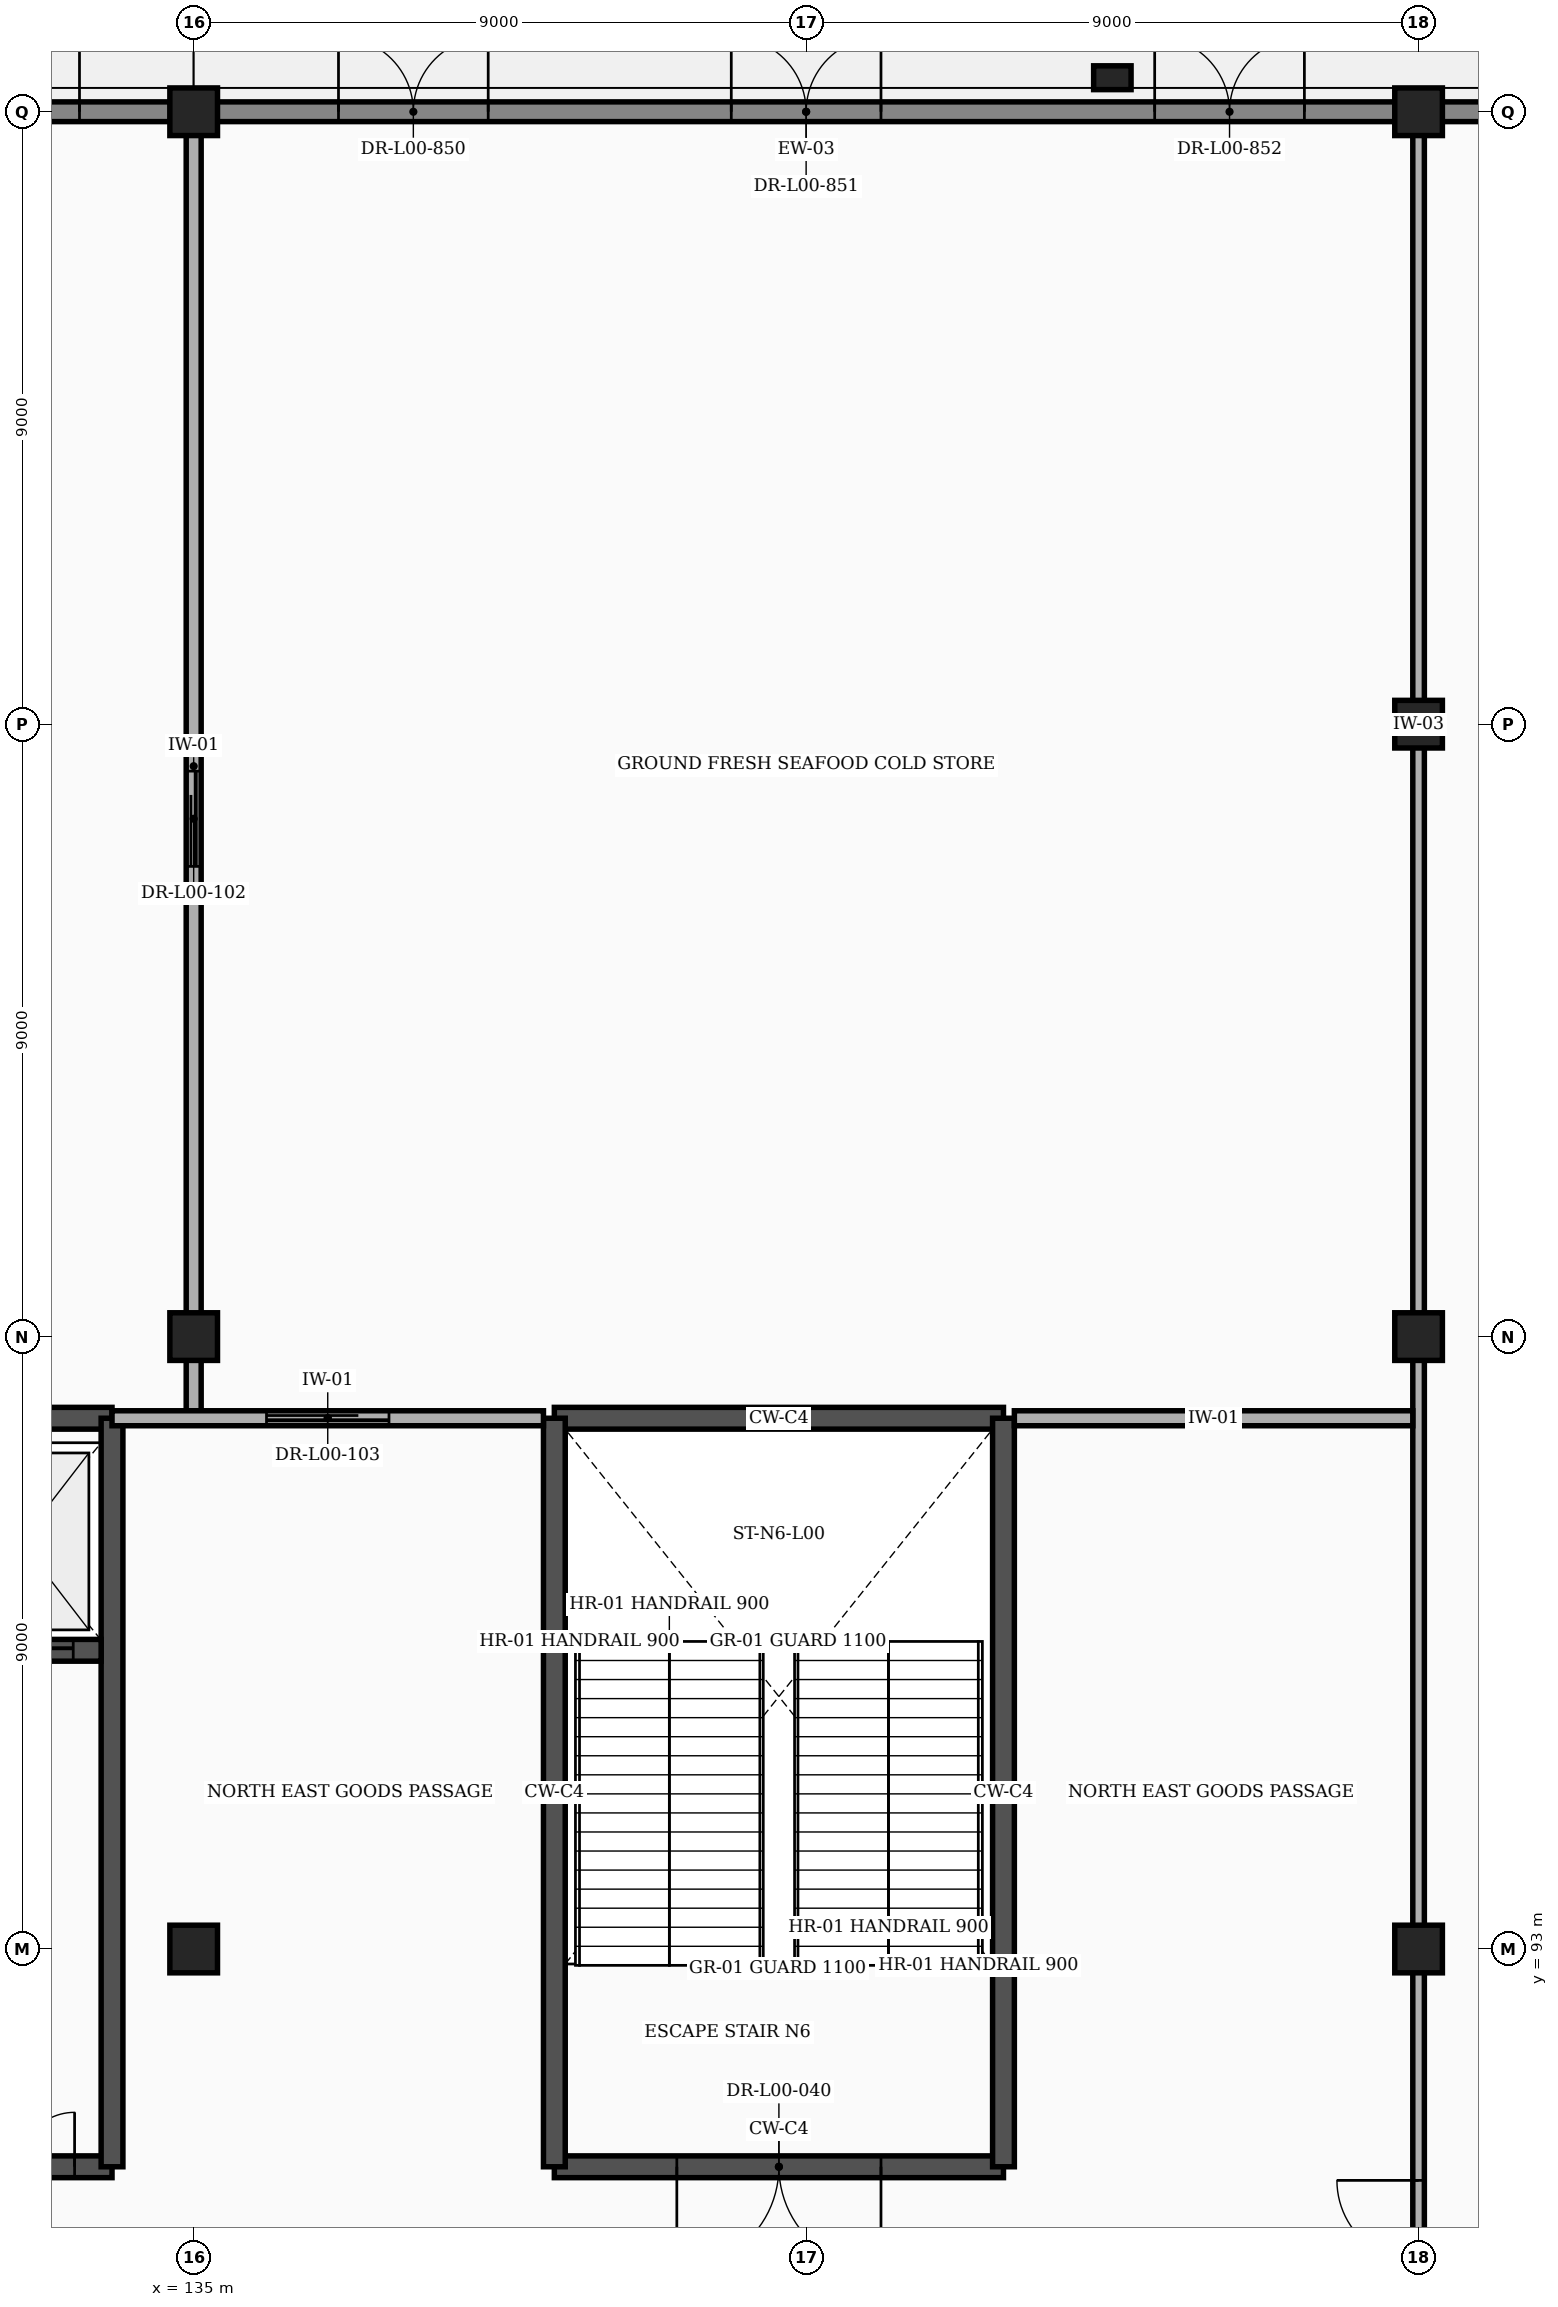
"""IFC4 building model, lengths in metres.
Left out: names, types, materials, properties, quantities, classifications, styles, units other than length and angle.
Written with IfcOpenShell. Run it as: python <this file> out.ifc"""

import sys

from ifc_helpers import new_model, si_unit, direction, frame, frame_2d, origin, origin_2d, place, context, subcontext, project, spatial, rectangle, extrude, element, fill, save


model = new_model("IFC4")
c1 = context("Model", 3, precision=1e-05, world=origin(), true_north=direction((0.0, 1.0)))
c2 = subcontext(c1, "Body", "Model", "MODEL_VIEW")
j1 = project(units=[si_unit("LENGTHUNIT", "METRE"), si_unit("PLANEANGLEUNIT", "RADIAN")], contexts=[c1])
p1 = place(None, origin())
s1 = spatial("IfcSite", under=j1, at=p1, CompositionType="ELEMENT")
p2 = place(p1, origin())
s2 = spatial("IfcBuilding", under=s1, at=p2, CompositionType="ELEMENT")
p3 = place(p2, origin())
s3 = spatial("IfcBuildingStorey", under=s2, at=p3, CompositionType="ELEMENT", Elevation=0.0)
for number, where, z_axis, x_axis in (
    (1, (135.0, 93.0, 0.0), (0.0, 0.0, 1.0), (1.0, 0.0, 0.0)),
    (2, (135.0, 102.0, 0.0), (0.0, 0.0, 1.0), (1.0, 0.0, 0.0)),
    (3, (135.0, 120.0, 0.0), (0.0, 0.0, 1.0), (1.0, 0.0, 0.0)),
    (4, (153.0, 93.0, 0.0), (0.0, 0.0, 1.0), (1.0, 0.0, 0.0)),
    (5, (153.0, 102.0, 0.0), (0.0, 0.0, 1.0), (1.0, 0.0, 0.0)),
    (6, (153.0, 111.0, 0.0), (0.0, 0.0, 1.0), (1.0, 0.0, 0.0)),
    (7, (153.0, 120.0, 0.0), (0.0, 0.0, 1.0), (1.0, 0.0, 0.0)),
):
    element("IfcColumn", number, at=place(p3, frame(where, z_axis=z_axis, x_axis=x_axis)), inside=s3, PredefinedType="COLUMN", context=c2, shape_type="SweptSolid", body=[
        extrude(rectangle(XDim=0.7, YDim=0.7, at=origin_2d()), origin(), (0.0, 0.0, 1.0), 6.0),
    ])
p4 = place(p3, frame((148.5, 120.5, 0.0), z_axis=(0.0, 0.0, 1.0), x_axis=(1.0, 0.0, 0.0)))
e8 = element("IfcColumn", 8, at=p4, inside=s3, PredefinedType="PILASTER", context=c2, shape_type="SweptSolid", body=[
    extrude(rectangle(XDim=0.55, YDim=0.35, at=origin_2d()), origin(), (0.0, 0.0, 1.0), 6.0),
])
p5 = place(p3, frame((117.342, 120.0, 0.0), z_axis=(0.0, 0.0, 1.0), x_axis=(1.0, 0.0, 0.0)))
e9 = element("IfcWall", 9, at=p5, inside=s3, PredefinedType="STANDARD", context=c2, shape_type="SweptSolid", body=[
    extrude(rectangle(XDim=17.316, YDim=0.29, at=frame_2d((8.658, 0.0))), origin(), (0.0, 0.0, 1.0), 4.988),
])
p6 = place(p5, frame((1.786, 0.0, 0.0)))
e10 = element("IfcOpeningElement", 10, at=p6, cuts=e9, PredefinedType="OPENING", context=c2, shape_type="SweptSolid", body=[
    extrude(rectangle(XDim=2.2, YDim=2.4, at=frame_2d((1.1, 1.2))), frame((0.0, 0.157, 0.0), z_axis=(0.0, -1.0, 0.0), x_axis=(1.0, 0.0, 0.0)), (0.0, 0.0, 1.0), 0.314),
])
p7 = place(p5, frame((7.558, 0.0, 0.0)))
e11 = element("IfcOpeningElement", 11, at=p7, cuts=e9, PredefinedType="OPENING", context=c2, shape_type="SweptSolid", body=[
    extrude(rectangle(XDim=2.2, YDim=2.4, at=frame_2d((1.1, 1.2))), frame((0.0, 0.157, 0.0), z_axis=(0.0, -1.0, 0.0), x_axis=(1.0, 0.0, 0.0)), (0.0, 0.0, 1.0), 0.314),
])
p8 = place(p5, frame((13.78, 0.0, 0.0)))
e12 = element("IfcOpeningElement", 12, at=p8, cuts=e9, PredefinedType="OPENING", context=c2, shape_type="SweptSolid", body=[
    extrude(rectangle(XDim=2.2, YDim=2.4, at=frame_2d((1.1, 1.2))), frame((0.0, 0.157, 0.0), z_axis=(0.0, -1.0, 0.0), x_axis=(1.0, 0.0, 0.0)), (0.0, 0.0, 1.0), 0.314),
])
p9 = place(p3, frame((135.342, 120.0, 0.0), z_axis=(0.0, 0.0, 1.0), x_axis=(1.0, 0.0, 0.0)))
e13 = element("IfcWall", 13, at=p9, inside=s3, PredefinedType="STANDARD", context=c2, shape_type="SweptSolid", body=[
    extrude(rectangle(XDim=17.316, YDim=0.29, at=frame_2d((8.658, 0.0))), origin(), (0.0, 0.0, 1.0), 4.988),
])
p10 = place(p9, frame((1.786, 0.0, 0.0)))
e14 = element("IfcOpeningElement", 14, at=p10, cuts=e13, PredefinedType="OPENING", context=c2, shape_type="SweptSolid", body=[
    extrude(rectangle(XDim=2.2, YDim=2.4, at=frame_2d((1.1, 1.2))), frame((0.0, 0.157, 0.0), z_axis=(0.0, -1.0, 0.0), x_axis=(1.0, 0.0, 0.0)), (0.0, 0.0, 1.0), 0.314),
])
p11 = place(p9, frame((7.558, 0.0, 0.0)))
e15 = element("IfcOpeningElement", 15, at=p11, cuts=e13, PredefinedType="OPENING", context=c2, shape_type="SweptSolid", body=[
    extrude(rectangle(XDim=2.2, YDim=2.4, at=frame_2d((1.1, 1.2))), frame((0.0, 0.157, 0.0), z_axis=(0.0, -1.0, 0.0), x_axis=(1.0, 0.0, 0.0)), (0.0, 0.0, 1.0), 0.314),
])
p12 = place(p9, frame((13.78, 0.0, 0.0)))
e16 = element("IfcOpeningElement", 16, at=p12, cuts=e13, PredefinedType="OPENING", context=c2, shape_type="SweptSolid", body=[
    extrude(rectangle(XDim=2.2, YDim=2.4, at=frame_2d((1.1, 1.2))), frame((0.0, 0.157, 0.0), z_axis=(0.0, -1.0, 0.0), x_axis=(1.0, 0.0, 0.0)), (0.0, 0.0, 1.0), 0.314),
])
p13 = place(p3, frame((153.342, 120.0, 0.0), z_axis=(0.0, 0.0, 1.0), x_axis=(1.0, 0.0, 0.0)))
e17 = element("IfcWall", 17, at=p13, inside=s3, PredefinedType="STANDARD", context=c2, shape_type="SweptSolid", body=[
    extrude(rectangle(XDim=8.316, YDim=0.29, at=frame_2d((4.158, 0.0))), origin(), (0.0, 0.0, 1.0), 5.138),
])
p14 = place(p13, frame((0.558, 0.0, 0.0)))
e18 = element("IfcOpeningElement", 18, at=p14, cuts=e17, PredefinedType="OPENING", context=c2, shape_type="SweptSolid", body=[
    extrude(rectangle(XDim=3.0, YDim=2.4, at=frame_2d((1.5, 1.2))), frame((0.0, 0.157, 0.0), z_axis=(0.0, -1.0, 0.0), x_axis=(1.0, 0.0, 0.0)), (0.0, 0.0, 1.0), 0.314),
])
p15 = place(p13, frame((4.058, 0.0, 0.0)))
e19 = element("IfcOpeningElement", 19, at=p15, cuts=e17, PredefinedType="OPENING", context=c2, shape_type="SweptSolid", body=[
    extrude(rectangle(XDim=3.0, YDim=2.4, at=frame_2d((1.5, 1.2))), frame((0.0, 0.157, 0.0), z_axis=(0.0, -1.0, 0.0), x_axis=(1.0, 0.0, 0.0)), (0.0, 0.0, 1.0), 0.314),
])
p16 = place(p3, frame((127.2, 89.8, 0.0), z_axis=(0.0, 0.0, 1.0), x_axis=(1.0, 0.0, 0.0)))
e20 = element("IfcWall", 20, at=p16, inside=s3, PredefinedType="SHEAR", context=c2, shape_type="SweptSolid", body=[
    extrude(rectangle(XDim=6.6, YDim=0.32, at=frame_2d((3.3, 0.0))), origin(), (0.0, 0.0, 1.0), 5.75),
])
p17 = place(p16, frame((4.45, 0.0, 0.0)))
e21 = element("IfcOpeningElement", 21, at=p17, cuts=e20, PredefinedType="OPENING", context=c2, shape_type="SweptSolid", body=[
    extrude(rectangle(XDim=1.6, YDim=2.3, at=frame_2d((0.8, 1.15))), frame((0.0, 0.172, 0.0), z_axis=(0.0, -1.0, 0.0), x_axis=(1.0, 0.0, 0.0)), (0.0, 0.0, 1.0), 0.344),
])
p18 = place(p3, frame((127.2, 100.8, 0.0), z_axis=(0.0, 0.0, 1.0), x_axis=(1.0, 0.0, 0.0)))
e22 = element("IfcWall", 22, at=p18, inside=s3, PredefinedType="SHEAR", context=c2, shape_type="SweptSolid", body=[
    extrude(rectangle(XDim=6.6, YDim=0.32, at=frame_2d((3.3, 0.0))), origin(), (0.0, 0.0, 1.0), 5.75),
])
p19 = place(p3, frame((133.8, 89.8, 0.0), z_axis=(0.0, 0.0, 1.0), x_axis=(0.0, 1.0, 0.0)))
e23 = element("IfcWall", 23, at=p19, inside=s3, PredefinedType="SHEAR", context=c2, shape_type="SweptSolid", body=[
    extrude(rectangle(XDim=11.0, YDim=0.32, at=frame_2d((5.5, 0.0))), origin(), (0.0, 0.0, 1.0), 5.75),
])
p20 = place(p3, frame((131.28, 97.39, 0.0), z_axis=(0.0, 0.0, 1.0), x_axis=(1.0, 0.0, 0.0)))
e24 = element("IfcWall", 24, at=p20, inside=s3, PredefinedType="SHEAR", context=c2, shape_type="SweptSolid", body=[
    extrude(rectangle(XDim=2.36, YDim=0.32, at=frame_2d((1.18, 0.0))), origin(), (0.0, 0.0, 1.0), 5.75),
])
p21 = place(p20, frame((0.3, 0.0, 0.0)))
e25 = element("IfcOpeningElement", 25, at=p21, cuts=e24, PredefinedType="OPENING", context=c2, shape_type="SweptSolid", body=[
    extrude(rectangle(XDim=1.65, YDim=2.35, at=frame_2d((0.825, 1.175))), frame((0.0, 0.172, 0.0), z_axis=(0.0, -1.0, 0.0), x_axis=(1.0, 0.0, 0.0)), (0.0, 0.0, 1.0), 0.344),
])
p22 = place(p3, frame((140.3, 89.8, 0.0), z_axis=(0.0, 0.0, 1.0), x_axis=(1.0, 0.0, 0.0)))
e26 = element("IfcWall", 26, at=p22, inside=s3, PredefinedType="SHEAR", context=c2, shape_type="SweptSolid", body=[
    extrude(rectangle(XDim=6.6, YDim=0.32, at=frame_2d((3.3, 0.0))), origin(), (0.0, 0.0, 1.0), 5.75),
])
p23 = place(p22, frame((1.8, 0.0, 0.0)))
e27 = element("IfcOpeningElement", 27, at=p23, cuts=e26, PredefinedType="OPENING", context=c2, shape_type="SweptSolid", body=[
    extrude(rectangle(XDim=3.0, YDim=2.25, at=frame_2d((1.5, 1.125))), frame((0.0, 0.172, 0.0), z_axis=(0.0, -1.0, 0.0), x_axis=(1.0, 0.0, 0.0)), (0.0, 0.0, 1.0), 0.344),
])
p24 = place(p3, frame((140.3, 100.8, 0.0), z_axis=(0.0, 0.0, 1.0), x_axis=(1.0, 0.0, 0.0)))
e28 = element("IfcWall", 28, at=p24, inside=s3, PredefinedType="SHEAR", context=c2, shape_type="SweptSolid", body=[
    extrude(rectangle(XDim=6.6, YDim=0.32, at=frame_2d((3.3, 0.0))), origin(), (0.0, 0.0, 1.0), 5.75),
])
for number, where, z_axis, x_axis in (
    (29, (140.3, 89.8, 0.0), (0.0, 0.0, 1.0), (0.0, 1.0, 0.0)),
    (30, (146.9, 89.8, 0.0), (0.0, 0.0, 1.0), (0.0, 1.0, 0.0)),
):
    element("IfcWall", number, at=place(p3, frame(where, z_axis=z_axis, x_axis=x_axis)), inside=s3, PredefinedType="SHEAR", context=c2, shape_type="SweptSolid", body=[
        extrude(rectangle(XDim=11.0, YDim=0.32, at=frame_2d((5.5, 0.0))), origin(), (0.0, 0.0, 1.0), 5.75),
    ])
p25 = place(p3, frame((153.0, 84.22, 0.0), z_axis=(0.0, 0.0, 1.0), x_axis=(0.0, 1.0, 0.0)))
e31 = element("IfcWall", 31, at=p25, inside=s3, PredefinedType="PARTITIONING", context=c2, shape_type="SweptSolid", body=[
    extrude(rectangle(XDim=8.56, YDim=0.17, at=frame_2d((4.28, 0.0))), origin(), (0.0, 0.0, 1.0), 5.217),
])
p26 = place(p25, frame((2.98, 0.0, 0.0)))
e32 = element("IfcOpeningElement", 32, at=p26, cuts=e31, PredefinedType="OPENING", context=c2, shape_type="SweptSolid", body=[
    extrude(rectangle(XDim=2.4, YDim=2.2, at=frame_2d((1.2, 1.1))), frame((0.0, 0.097, 0.0), z_axis=(0.0, -1.0, 0.0), x_axis=(1.0, 0.0, 0.0)), (0.0, 0.0, 1.0), 0.194),
])
p27 = place(p3, frame((153.0, 93.22, 0.0), z_axis=(0.0, 0.0, 1.0), x_axis=(0.0, 1.0, 0.0)))
e33 = element("IfcWall", 33, at=p27, inside=s3, PredefinedType="PARTITIONING", context=c2, shape_type="SweptSolid", body=[
    extrude(rectangle(XDim=8.56, YDim=0.17, at=frame_2d((4.28, 0.0))), origin(), (0.0, 0.0, 1.0), 5.217),
])
p28 = place(p3, frame((153.0, 102.22, 0.0), z_axis=(0.0, 0.0, 1.0), x_axis=(0.0, 1.0, 0.0)))
e34 = element("IfcWall", 34, at=p28, inside=s3, PredefinedType="PARTITIONING", context=c2, shape_type="SweptSolid", body=[
    extrude(rectangle(XDim=17.56, YDim=0.17, at=frame_2d((8.78, 0.0))), origin(), (0.0, 0.0, 1.0), 5.217),
])
p29 = place(p3, frame((135.0, 100.91, 0.0), z_axis=(0.0, 0.0, 1.0), x_axis=(0.0, 1.0, 0.0)))
e35 = element("IfcWall", 35, at=p29, inside=s3, PredefinedType="PARTITIONING", context=c2, shape_type="SweptSolid", body=[
    extrude(rectangle(XDim=18.945, YDim=0.22, at=frame_2d((9.473, 0.0))), origin(), (0.0, 0.0, 1.0), 5.138),
])
p30 = place(p29, frame((8.0, 0.0, 0.0)))
e36 = element("IfcOpeningElement", 36, at=p30, cuts=e35, PredefinedType="OPENING", context=c2, shape_type="SweptSolid", body=[
    extrude(rectangle(XDim=1.4, YDim=2.35, at=frame_2d((0.7, 1.175))), frame((0.0, 0.122, 0.0), z_axis=(0.0, -1.0, 0.0), x_axis=(1.0, 0.0, 0.0)), (0.0, 0.0, 1.0), 0.244),
])
p31 = place(p3, frame((133.8, 100.8, 0.0), z_axis=(0.0, 0.0, 1.0), x_axis=(1.0, 0.0, 0.0)))
e37 = element("IfcWall", 37, at=p31, inside=s3, PredefinedType="PARTITIONING", context=c2, shape_type="SweptSolid", body=[
    extrude(rectangle(XDim=6.34, YDim=0.22, at=frame_2d((3.17, 0.0))), origin(), (0.0, 0.0, 1.0), 5.75),
])
p32 = place(p31, frame((2.27, 0.0, 0.0)))
e38 = element("IfcOpeningElement", 38, at=p32, cuts=e37, PredefinedType="OPENING", context=c2, shape_type="SweptSolid", body=[
    extrude(rectangle(XDim=1.8, YDim=2.5, at=frame_2d((0.9, 1.25))), frame((0.0, 0.122, 0.0), z_axis=(0.0, -1.0, 0.0), x_axis=(1.0, 0.0, 0.0)), (0.0, 0.0, 1.0), 0.244),
])
p33 = place(p3, frame((147.06, 100.8, 0.0), z_axis=(0.0, 0.0, 1.0), x_axis=(1.0, 0.0, 0.0)))
e39 = element("IfcWall", 39, at=p33, inside=s3, PredefinedType="PARTITIONING", context=c2, shape_type="SweptSolid", body=[
    extrude(rectangle(XDim=5.855, YDim=0.22, at=frame_2d((2.927, 0.0))), origin(), (0.0, 0.0, 1.0), 5.75),
])
p34 = place(p8, origin())
e40 = element("IfcDoor", 40, at=p34, inside=s3, OperationType="DOUBLE_DOOR_SINGLE_SWING", PredefinedType="DOOR", context=c2, shape_type="SweptSolid", body=[
    extrude(rectangle(XDim=2.2, YDim=2.4, at=frame_2d((1.1, 1.2))), frame((0.0, 0.025, 0.0), z_axis=(0.0, -1.0, 0.0), x_axis=(1.0, 0.0, 0.0)), (0.0, 0.0, 1.0), 0.05),
])
fill(e12, e40)
p35 = place(p10, origin())
e41 = element("IfcDoor", 41, at=p35, inside=s3, OperationType="DOUBLE_DOOR_SINGLE_SWING", PredefinedType="DOOR", context=c2, shape_type="SweptSolid", body=[
    extrude(rectangle(XDim=2.2, YDim=2.4, at=frame_2d((1.1, 1.2))), frame((0.0, 0.025, 0.0), z_axis=(0.0, -1.0, 0.0), x_axis=(1.0, 0.0, 0.0)), (0.0, 0.0, 1.0), 0.05),
])
fill(e14, e41)
p36 = place(p11, origin())
e42 = element("IfcDoor", 42, at=p36, inside=s3, OperationType="DOUBLE_DOOR_SINGLE_SWING", PredefinedType="DOOR", context=c2, shape_type="SweptSolid", body=[
    extrude(rectangle(XDim=2.2, YDim=2.4, at=frame_2d((1.1, 1.2))), frame((0.0, 0.025, 0.0), z_axis=(0.0, -1.0, 0.0), x_axis=(1.0, 0.0, 0.0)), (0.0, 0.0, 1.0), 0.05),
])
fill(e15, e42)
p37 = place(p12, origin())
e43 = element("IfcDoor", 43, at=p37, inside=s3, OperationType="DOUBLE_DOOR_SINGLE_SWING", PredefinedType="DOOR", context=c2, shape_type="SweptSolid", body=[
    extrude(rectangle(XDim=2.2, YDim=2.4, at=frame_2d((1.1, 1.2))), frame((0.0, 0.025, 0.0), z_axis=(0.0, -1.0, 0.0), x_axis=(1.0, 0.0, 0.0)), (0.0, 0.0, 1.0), 0.05),
])
fill(e16, e43)
p38 = place(p21, origin())
e44 = element("IfcDoor", 44, at=p38, inside=s3, OperationType="DOUBLE_DOOR_SLIDING", PredefinedType="DOOR", context=c2, shape_type="SweptSolid", body=[
    extrude(rectangle(XDim=1.65, YDim=2.35, at=frame_2d((0.825, 1.175))), frame((0.0, 0.025, 0.0), z_axis=(0.0, -1.0, 0.0), x_axis=(1.0, 0.0, 0.0)), (0.0, 0.0, 1.0), 0.05),
])
fill(e25, e44)
p39 = place(p17, origin())
e45 = element("IfcDoor", 45, at=p39, inside=s3, OperationType="DOUBLE_DOOR_SINGLE_SWING", PredefinedType="DOOR", context=c2, shape_type="SweptSolid", body=[
    extrude(rectangle(XDim=1.6, YDim=2.3, at=frame_2d((0.8, 1.15))), frame((0.0, 0.025, 0.0), z_axis=(0.0, -1.0, 0.0), x_axis=(1.0, 0.0, 0.0)), (0.0, 0.0, 1.0), 0.05),
])
fill(e21, e45)
p40 = place(p23, frame((3.0, 0.0, 0.0), z_axis=(0.0, 0.0, 1.0), x_axis=(-1.0, 0.0, 0.0)))
e46 = element("IfcDoor", 46, at=p40, inside=s3, OperationType="DOUBLE_DOOR_SINGLE_SWING", PredefinedType="DOOR", context=c2, shape_type="SweptSolid", body=[
    extrude(rectangle(XDim=3.0, YDim=2.25, at=frame_2d((1.5, 1.125))), frame((0.0, 0.025, 0.0), z_axis=(0.0, -1.0, 0.0), x_axis=(1.0, 0.0, 0.0)), (0.0, 0.0, 1.0), 0.05),
])
fill(e27, e46)
p41 = place(p26, origin())
e47 = element("IfcDoor", 47, at=p41, inside=s3, OperationType="DOUBLE_DOOR_SINGLE_SWING", PredefinedType="DOOR", context=c2, shape_type="SweptSolid", body=[
    extrude(rectangle(XDim=2.4, YDim=2.2, at=frame_2d((1.2, 1.1))), frame((0.0, 0.025, 0.0), z_axis=(0.0, -1.0, 0.0), x_axis=(1.0, 0.0, 0.0)), (0.0, 0.0, 1.0), 0.05),
])
fill(e32, e47)
p42 = place(p30, origin())
e48 = element("IfcDoor", 48, at=p42, inside=s3, OperationType="SLIDING_TO_LEFT", PredefinedType="DOOR", context=c2, shape_type="SweptSolid", body=[
    extrude(rectangle(XDim=1.4, YDim=2.35, at=frame_2d((0.7, 1.175))), frame((0.0, 0.025, 0.0), z_axis=(0.0, -1.0, 0.0), x_axis=(1.0, 0.0, 0.0)), (0.0, 0.0, 1.0), 0.05),
])
fill(e36, e48)
p43 = place(p32, origin())
e49 = element("IfcDoor", 49, at=p43, inside=s3, OperationType="SLIDING_TO_LEFT", PredefinedType="DOOR", context=c2, shape_type="SweptSolid", body=[
    extrude(rectangle(XDim=1.8, YDim=2.5, at=frame_2d((0.9, 1.25))), frame((0.0, 0.025, 0.0), z_axis=(0.0, -1.0, 0.0), x_axis=(1.0, 0.0, 0.0)), (0.0, 0.0, 1.0), 0.05),
])
fill(e38, e49)
save(model, sys.argv[1])
